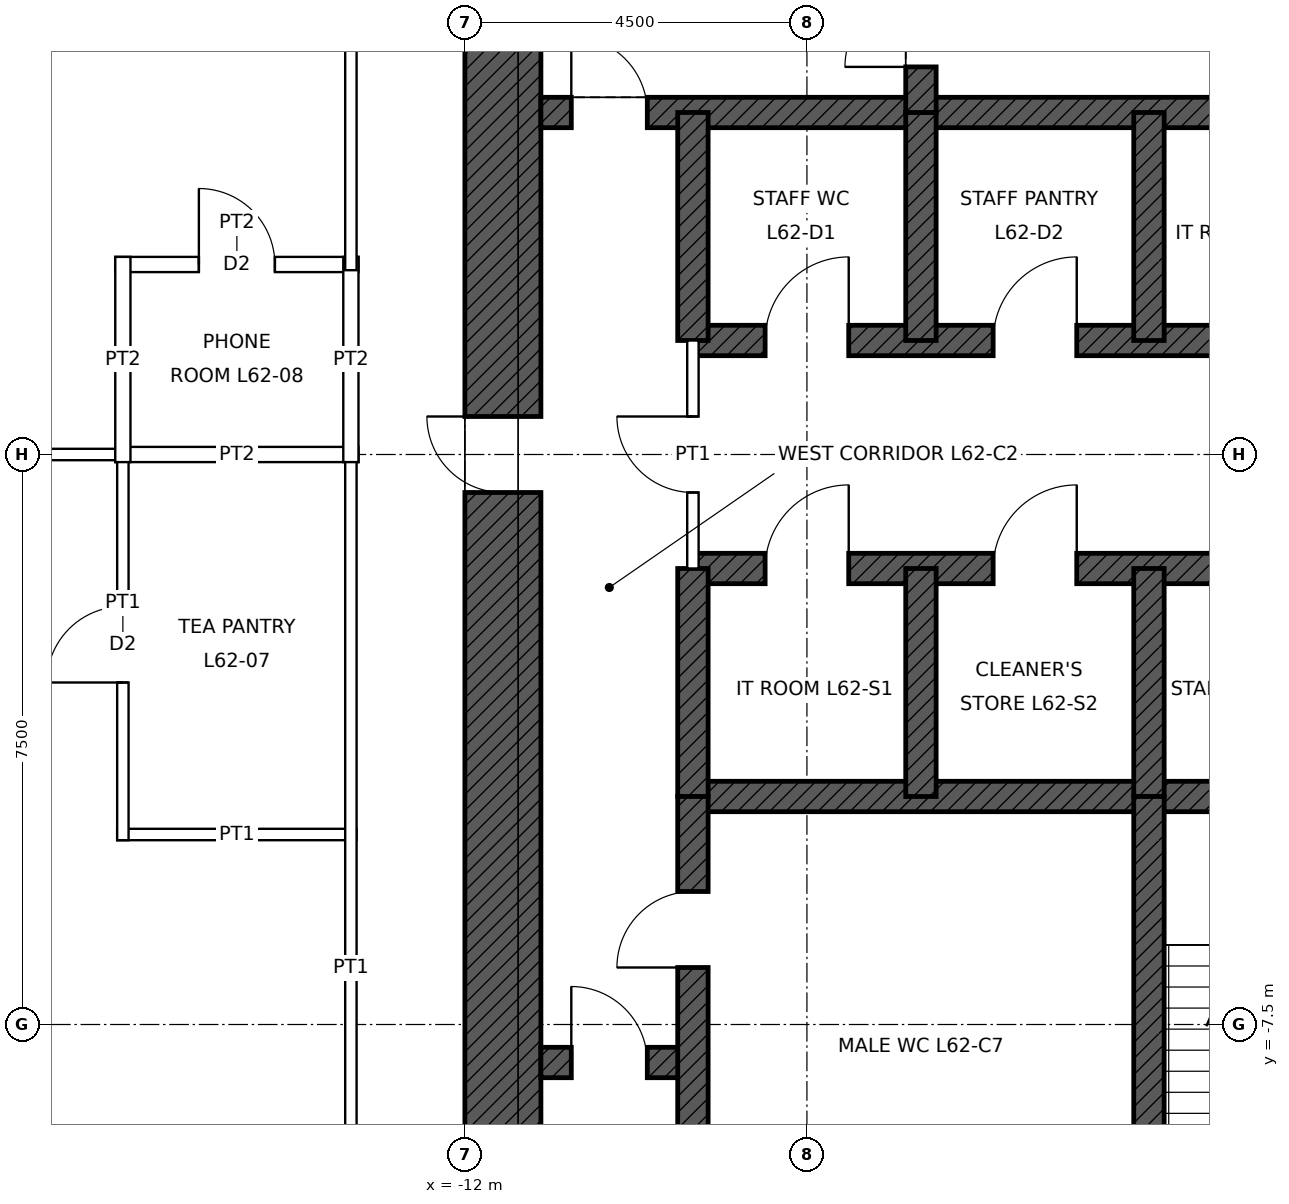
"""IFC4 building model, lengths in metres.
Left out: names, types, materials, properties, quantities, classifications, styles, units other than length and angle.
Written with IfcOpenShell. Run it as: python <this file> out.ifc"""

import sys

from ifc_helpers import new_model, si_unit, direction, frame, frame_2d, origin, place, context, subcontext, project, spatial, rectangle, extrude, element, fill, save


model = new_model("IFC4")
c1 = context("Model", 3, precision=1e-05, world=origin(), true_north=direction((0.0, 1.0)))
c2 = subcontext(c1, "Body", "Model", "MODEL_VIEW")
j1 = project(units=[si_unit("LENGTHUNIT", "METRE"), si_unit("PLANEANGLEUNIT", "RADIAN")], contexts=[c1])
p1 = place(None, origin())
s1 = spatial("IfcSite", under=j1, at=p1, CompositionType="ELEMENT")
p2 = place(p1, origin())
s2 = spatial("IfcBuilding", under=s1, at=p2, CompositionType="ELEMENT")
p3 = place(p2, frame((0.0, 0.0, 283.9)))
s3 = spatial("IfcBuildingStorey", under=s2, at=p3, CompositionType="ELEMENT", Elevation=283.9)
p4 = place(p3, frame((-11.5, -11.0, 0.0), z_axis=(0.0, 0.0, 1.0), x_axis=(0.0, 1.0, 0.0)))
e1 = element("IfcWall", 1, at=p4, inside=s3, PredefinedType="SHEAR", context=c2, shape_type="SweptSolid", body=[
    extrude(rectangle(XDim=22.0, YDim=1.0, at=frame_2d((11.0, 0.0))), origin(), (0.0, 0.0, 1.0), 4.0),
])
p5 = place(p4, frame((10.5, 0.0, 0.0)))
e2 = element("IfcOpeningElement", 2, at=p5, cuts=e1, PredefinedType="OPENING", context=c2, shape_type="SweptSolid", body=[
    extrude(rectangle(XDim=1.0, YDim=2.4, at=frame_2d((0.5, 1.2))), frame((0.0, 0.51, 0.0), z_axis=(0.0, -1.0, 0.0), x_axis=(1.0, 0.0, 0.0)), (0.0, 0.0, 1.0), 1.02),
])
p6 = place(p3, frame((-11.0, 4.5, 0.0), z_axis=(0.0, 0.0, 1.0), x_axis=(1.0, 0.0, 0.0)))
e3 = element("IfcWall", 3, at=p6, inside=s3, PredefinedType="SHEAR", context=c2, shape_type="SweptSolid", body=[
    extrude(rectangle(XDim=22.0, YDim=0.4, at=frame_2d((11.0, 0.0))), origin(), (0.0, 0.0, 1.0), 4.0),
])
p7 = place(p6, frame((0.4, 0.0, 0.0)))
e4 = element("IfcOpeningElement", 4, at=p7, cuts=e3, PredefinedType="OPENING", context=c2, shape_type="SweptSolid", body=[
    extrude(rectangle(XDim=1.0, YDim=2.1, at=frame_2d((0.5, 1.05))), frame((0.0, 0.21, 0.0), z_axis=(0.0, -1.0, 0.0), x_axis=(1.0, 0.0, 0.0)), (0.0, 0.0, 1.0), 0.42),
])
p8 = place(p6, frame((20.6, 0.0, 0.0)))
e5 = element("IfcOpeningElement", 5, at=p8, cuts=e3, PredefinedType="OPENING", context=c2, shape_type="SweptSolid", body=[
    extrude(rectangle(XDim=1.0, YDim=2.1, at=frame_2d((0.5, 1.05))), frame((0.0, 0.21, 0.0), z_axis=(0.0, -1.0, 0.0), x_axis=(1.0, 0.0, 0.0)), (0.0, 0.0, 1.0), 0.42),
])
p9 = place(p3, frame((-9.0, 1.5, 0.0), z_axis=(0.0, 0.0, 1.0), x_axis=(1.0, 0.0, 0.0)))
e6 = element("IfcWall", 6, at=p9, inside=s3, PredefinedType="SHEAR", context=c2, shape_type="SweptSolid", body=[
    extrude(rectangle(XDim=18.0, YDim=0.4, at=frame_2d((9.0, 0.0))), origin(), (0.0, 0.0, 1.0), 4.0),
])
p10 = place(p9, frame((0.95, 0.0, 0.0)))
e7 = element("IfcOpeningElement", 7, at=p10, cuts=e6, PredefinedType="OPENING", context=c2, shape_type="SweptSolid", body=[
    extrude(rectangle(XDim=1.1, YDim=2.1, at=frame_2d((0.55, 1.05))), frame((0.0, 0.21, 0.0), z_axis=(0.0, -1.0, 0.0), x_axis=(1.0, 0.0, 0.0)), (0.0, 0.0, 1.0), 0.42),
])
p11 = place(p9, frame((3.95, 0.0, 0.0)))
e8 = element("IfcOpeningElement", 8, at=p11, cuts=e6, PredefinedType="OPENING", context=c2, shape_type="SweptSolid", body=[
    extrude(rectangle(XDim=1.1, YDim=2.1, at=frame_2d((0.55, 1.05))), frame((0.0, 0.21, 0.0), z_axis=(0.0, -1.0, 0.0), x_axis=(1.0, 0.0, 0.0)), (0.0, 0.0, 1.0), 0.42),
])
p12 = place(p9, frame((6.95, 0.0, 0.0)))
e9 = element("IfcOpeningElement", 9, at=p12, cuts=e6, PredefinedType="OPENING", context=c2, shape_type="SweptSolid", body=[
    extrude(rectangle(XDim=1.1, YDim=2.1, at=frame_2d((0.55, 1.05))), frame((0.0, 0.21, 0.0), z_axis=(0.0, -1.0, 0.0), x_axis=(1.0, 0.0, 0.0)), (0.0, 0.0, 1.0), 0.42),
])
p13 = place(p9, frame((9.95, 0.0, 0.0)))
e10 = element("IfcOpeningElement", 10, at=p13, cuts=e6, PredefinedType="OPENING", context=c2, shape_type="SweptSolid", body=[
    extrude(rectangle(XDim=1.1, YDim=2.1, at=frame_2d((0.55, 1.05))), frame((0.0, 0.21, 0.0), z_axis=(0.0, -1.0, 0.0), x_axis=(1.0, 0.0, 0.0)), (0.0, 0.0, 1.0), 0.42),
])
p14 = place(p9, frame((12.95, 0.0, 0.0)))
e11 = element("IfcOpeningElement", 11, at=p14, cuts=e6, PredefinedType="OPENING", context=c2, shape_type="SweptSolid", body=[
    extrude(rectangle(XDim=1.1, YDim=2.1, at=frame_2d((0.55, 1.05))), frame((0.0, 0.21, 0.0), z_axis=(0.0, -1.0, 0.0), x_axis=(1.0, 0.0, 0.0)), (0.0, 0.0, 1.0), 0.42),
])
p15 = place(p9, frame((15.95, 0.0, 0.0)))
e12 = element("IfcOpeningElement", 12, at=p15, cuts=e6, PredefinedType="OPENING", context=c2, shape_type="SweptSolid", body=[
    extrude(rectangle(XDim=1.1, YDim=2.1, at=frame_2d((0.55, 1.05))), frame((0.0, 0.21, 0.0), z_axis=(0.0, -1.0, 0.0), x_axis=(1.0, 0.0, 0.0)), (0.0, 0.0, 1.0), 0.42),
])
p16 = place(p3, frame((-9.0, -1.5, 0.0), z_axis=(0.0, 0.0, 1.0), x_axis=(1.0, 0.0, 0.0)))
e13 = element("IfcWall", 13, at=p16, inside=s3, PredefinedType="SHEAR", context=c2, shape_type="SweptSolid", body=[
    extrude(rectangle(XDim=18.0, YDim=0.4, at=frame_2d((9.0, 0.0))), origin(), (0.0, 0.0, 1.0), 4.0),
])
p17 = place(p16, frame((9.95, 0.0, 0.0)))
e14 = element("IfcOpeningElement", 14, at=p17, cuts=e13, PredefinedType="OPENING", context=c2, shape_type="SweptSolid", body=[
    extrude(rectangle(XDim=1.1, YDim=2.1, at=frame_2d((0.55, 1.05))), frame((0.0, 0.21, 0.0), z_axis=(0.0, -1.0, 0.0), x_axis=(1.0, 0.0, 0.0)), (0.0, 0.0, 1.0), 0.42),
])
p18 = place(p16, frame((12.95, 0.0, 0.0)))
e15 = element("IfcOpeningElement", 15, at=p18, cuts=e13, PredefinedType="OPENING", context=c2, shape_type="SweptSolid", body=[
    extrude(rectangle(XDim=1.1, YDim=2.1, at=frame_2d((0.55, 1.05))), frame((0.0, 0.21, 0.0), z_axis=(0.0, -1.0, 0.0), x_axis=(1.0, 0.0, 0.0)), (0.0, 0.0, 1.0), 0.42),
])
p19 = place(p16, frame((15.95, 0.0, 0.0)))
e16 = element("IfcOpeningElement", 16, at=p19, cuts=e13, PredefinedType="OPENING", context=c2, shape_type="SweptSolid", body=[
    extrude(rectangle(XDim=1.1, YDim=2.1, at=frame_2d((0.55, 1.05))), frame((0.0, 0.21, 0.0), z_axis=(0.0, -1.0, 0.0), x_axis=(1.0, 0.0, 0.0)), (0.0, 0.0, 1.0), 0.42),
])
p20 = place(p16, frame((0.95, 0.0, 0.0)))
e17 = element("IfcOpeningElement", 17, at=p20, cuts=e13, PredefinedType="OPENING", context=c2, shape_type="SweptSolid", body=[
    extrude(rectangle(XDim=1.1, YDim=2.1, at=frame_2d((0.55, 1.05))), frame((0.0, 0.21, 0.0), z_axis=(0.0, -1.0, 0.0), x_axis=(1.0, 0.0, 0.0)), (0.0, 0.0, 1.0), 0.42),
])
p21 = place(p16, frame((3.95, 0.0, 0.0)))
e18 = element("IfcOpeningElement", 18, at=p21, cuts=e13, PredefinedType="OPENING", context=c2, shape_type="SweptSolid", body=[
    extrude(rectangle(XDim=1.1, YDim=2.1, at=frame_2d((0.55, 1.05))), frame((0.0, 0.21, 0.0), z_axis=(0.0, -1.0, 0.0), x_axis=(1.0, 0.0, 0.0)), (0.0, 0.0, 1.0), 0.42),
])
p22 = place(p16, frame((6.95, 0.0, 0.0)))
e19 = element("IfcOpeningElement", 19, at=p22, cuts=e13, PredefinedType="OPENING", context=c2, shape_type="SweptSolid", body=[
    extrude(rectangle(XDim=1.1, YDim=2.1, at=frame_2d((0.55, 1.05))), frame((0.0, 0.21, 0.0), z_axis=(0.0, -1.0, 0.0), x_axis=(1.0, 0.0, 0.0)), (0.0, 0.0, 1.0), 0.42),
])
p23 = place(p3, frame((-9.0, -4.5, 0.0), z_axis=(0.0, 0.0, 1.0), x_axis=(1.0, 0.0, 0.0)))
e20 = element("IfcWall", 20, at=p23, inside=s3, PredefinedType="SHEAR", context=c2, shape_type="SweptSolid", body=[
    extrude(rectangle(XDim=18.0, YDim=0.4, at=frame_2d((9.0, 0.0))), origin(), (0.0, 0.0, 1.0), 4.0),
])
p24 = place(p3, frame((-11.0, -8.0, 0.0), z_axis=(0.0, 0.0, 1.0), x_axis=(1.0, 0.0, 0.0)))
e21 = element("IfcWall", 21, at=p24, inside=s3, PredefinedType="SHEAR", context=c2, shape_type="SweptSolid", body=[
    extrude(rectangle(XDim=2.0, YDim=0.4, at=frame_2d((1.0, 0.0))), origin(), (0.0, 0.0, 1.0), 4.0),
])
p25 = place(p24, frame((0.4, 0.0, 0.0)))
e22 = element("IfcOpeningElement", 22, at=p25, cuts=e21, PredefinedType="OPENING", context=c2, shape_type="SweptSolid", body=[
    extrude(rectangle(XDim=1.0, YDim=2.1, at=frame_2d((0.5, 1.05))), frame((0.0, 0.21, 0.0), z_axis=(0.0, -1.0, 0.0), x_axis=(1.0, 0.0, 0.0)), (0.0, 0.0, 1.0), 0.42),
])
for number, where, z_axis, x_axis in (
    (23, (-9.0, 1.5, 0.0), (0.0, 0.0, 1.0), (0.0, 1.0, 0.0)),
    (24, (-9.0, -4.5, 0.0), (0.0, 0.0, 1.0), (0.0, 1.0, 0.0)),
    (25, (-6.0, 1.5, 0.0), (0.0, 0.0, 1.0), (0.0, 1.0, 0.0)),
    (26, (-3.0, 1.5, 0.0), (0.0, 0.0, 1.0), (0.0, 1.0, 0.0)),
    (27, (-6.0, -4.5, 0.0), (0.0, 0.0, 1.0), (0.0, 1.0, 0.0)),
    (28, (-3.0, -4.5, 0.0), (0.0, 0.0, 1.0), (0.0, 1.0, 0.0)),
):
    element("IfcWall", number, at=place(p3, frame(where, z_axis=z_axis, x_axis=x_axis)), inside=s3, PredefinedType="SHEAR", context=c2, shape_type="SweptSolid", body=[
        extrude(rectangle(XDim=3.0, YDim=0.4, at=frame_2d((1.5, 0.0))), origin(), (0.0, 0.0, 1.0), 4.0),
    ])
p26 = place(p3, frame((-6.0, 4.5, 0.0), z_axis=(0.0, 0.0, 1.0), x_axis=(0.0, 1.0, 0.0)))
e29 = element("IfcWall", 29, at=p26, inside=s3, PredefinedType="SHEAR", context=c2, shape_type="SweptSolid", body=[
    extrude(rectangle(XDim=6.5, YDim=0.4, at=frame_2d((3.25, 0.0))), origin(), (0.0, 0.0, 1.0), 4.0),
])
p27 = place(p26, frame((0.6, 0.0, 0.0)))
e30 = element("IfcOpeningElement", 30, at=p27, cuts=e29, PredefinedType="OPENING", context=c2, shape_type="SweptSolid", body=[
    extrude(rectangle(XDim=1.0, YDim=2.1, at=frame_2d((0.5, 1.05))), frame((0.0, 0.21, 0.0), z_axis=(0.0, -1.0, 0.0), x_axis=(1.0, 0.0, 0.0)), (0.0, 0.0, 1.0), 0.42),
])
p28 = place(p3, frame((-9.0, -11.0, 0.0), z_axis=(0.0, 0.0, 1.0), x_axis=(0.0, 1.0, 0.0)))
e31 = element("IfcWall", 31, at=p28, inside=s3, PredefinedType="SHEAR", context=c2, shape_type="SweptSolid", body=[
    extrude(rectangle(XDim=6.5, YDim=0.4, at=frame_2d((3.25, 0.0))), origin(), (0.0, 0.0, 1.0), 4.0),
])
p29 = place(p28, frame((4.25, 0.0, 0.0)))
e32 = element("IfcOpeningElement", 32, at=p29, cuts=e31, PredefinedType="OPENING", context=c2, shape_type="SweptSolid", body=[
    extrude(rectangle(XDim=1.0, YDim=2.1, at=frame_2d((0.5, 1.05))), frame((0.0, 0.21, 0.0), z_axis=(0.0, -1.0, 0.0), x_axis=(1.0, 0.0, 0.0)), (0.0, 0.0, 1.0), 0.42),
])
p30 = place(p3, frame((-3.0, -11.0, 0.0), z_axis=(0.0, 0.0, 1.0), x_axis=(0.0, 1.0, 0.0)))
e33 = element("IfcWall", 33, at=p30, inside=s3, PredefinedType="SHEAR", context=c2, shape_type="SweptSolid", body=[
    extrude(rectangle(XDim=6.5, YDim=0.4, at=frame_2d((3.25, 0.0))), origin(), (0.0, 0.0, 1.0), 4.0),
])
p31 = place(p3, frame((-16.575, -5.0, 0.0), z_axis=(0.0, 0.0, 1.0), x_axis=(1.0, 0.0, 0.0)))
e34 = element("IfcWall", 34, at=p31, inside=s3, PredefinedType="PARTITIONING", context=c2, shape_type="SweptSolid", body=[
    extrude(rectangle(XDim=3.15, YDim=0.15, at=frame_2d((1.575, 0.0))), origin(), (0.0, 0.0, 1.0), 3.85),
])
p32 = place(p3, frame((-19.54, 0.0, 0.0), z_axis=(0.0, 0.0, 1.0), x_axis=(1.0, 0.0, 0.0)))
e35 = element("IfcWall", 35, at=p32, inside=s3, PredefinedType="PARTITIONING", context=c2, shape_type="SweptSolid", body=[
    extrude(rectangle(XDim=3.115, YDim=0.15, at=frame_2d((1.558, 0.0))), origin(), (0.0, 0.0, 1.0), 3.243),
])
p33 = place(p3, frame((-16.6, 0.0, 0.0), z_axis=(0.0, 0.0, 1.0), x_axis=(1.0, 0.0, 0.0)))
e36 = element("IfcWall", 36, at=p33, inside=s3, PredefinedType="PARTITIONING", context=c2, shape_type="SweptSolid", body=[
    extrude(rectangle(XDim=3.2, YDim=0.2, at=frame_2d((1.6, 0.0))), origin(), (0.0, 0.0, 1.0), 3.243),
])
p34 = place(p3, frame((-16.6, 2.5, 0.0), z_axis=(0.0, 0.0, 1.0), x_axis=(1.0, 0.0, 0.0)))
e37 = element("IfcWall", 37, at=p34, inside=s3, PredefinedType="PARTITIONING", context=c2, shape_type="SweptSolid", body=[
    extrude(rectangle(XDim=3.2, YDim=0.2, at=frame_2d((1.6, 0.0))), origin(), (0.0, 0.0, 1.0), 3.85),
])
p35 = place(p34, frame((1.1, 0.0, 0.0)))
e38 = element("IfcOpeningElement", 38, at=p35, cuts=e37, PredefinedType="OPENING", context=c2, shape_type="SweptSolid", body=[
    extrude(rectangle(XDim=1.0, YDim=2.1, at=frame_2d((0.5, 1.05))), frame((0.0, 0.11, 0.0), z_axis=(0.0, -1.0, 0.0), x_axis=(1.0, 0.0, 0.0)), (0.0, 0.0, 1.0), 0.22),
])
p36 = place(p3, frame((-16.5, -5.075, 0.0), z_axis=(0.0, 0.0, 1.0), x_axis=(0.0, 1.0, 0.0)))
e39 = element("IfcWall", 39, at=p36, inside=s3, PredefinedType="PARTITIONING", context=c2, shape_type="SweptSolid", body=[
    extrude(rectangle(XDim=5.15, YDim=0.15, at=frame_2d((2.575, 0.0))), origin(), (0.0, 0.0, 1.0), 3.85),
])
p37 = place(p36, frame((2.075, 0.0, 0.0)))
e40 = element("IfcOpeningElement", 40, at=p37, cuts=e39, PredefinedType="OPENING", context=c2, shape_type="SweptSolid", body=[
    extrude(rectangle(XDim=1.0, YDim=2.1, at=frame_2d((0.5, 1.05))), frame((0.0, 0.085, 0.0), z_axis=(0.0, -1.0, 0.0), x_axis=(1.0, 0.0, 0.0)), (0.0, 0.0, 1.0), 0.17),
])
p38 = place(p3, frame((-16.5, -0.1, 0.0), z_axis=(0.0, 0.0, 1.0), x_axis=(0.0, 1.0, 0.0)))
e41 = element("IfcWall", 41, at=p38, inside=s3, PredefinedType="PARTITIONING", context=c2, shape_type="SweptSolid", body=[
    extrude(rectangle(XDim=2.7, YDim=0.2, at=frame_2d((1.35, 0.0))), origin(), (0.0, 0.0, 1.0), 3.85),
])
p39 = place(p3, frame((-13.5, -13.575, 0.0), z_axis=(0.0, 0.0, 1.0), x_axis=(0.0, 1.0, 0.0)))
e42 = element("IfcWall", 42, at=p39, inside=s3, PredefinedType="PARTITIONING", context=c2, shape_type="SweptSolid", body=[
    extrude(rectangle(XDim=13.65, YDim=0.15, at=frame_2d((6.825, 0.0))), origin(), (0.0, 0.0, 1.0), 3.85),
])
p40 = place(p3, frame((-13.5, -0.1, 0.0), z_axis=(0.0, 0.0, 1.0), x_axis=(0.0, 1.0, 0.0)))
e43 = element("IfcWall", 43, at=p40, inside=s3, PredefinedType="PARTITIONING", context=c2, shape_type="SweptSolid", body=[
    extrude(rectangle(XDim=2.7, YDim=0.2, at=frame_2d((1.35, 0.0))), origin(), (0.0, 0.0, 1.0), 3.85),
])
p41 = place(p3, frame((-13.5, 2.425, 0.0), z_axis=(0.0, 0.0, 1.0), x_axis=(0.0, 1.0, 0.0)))
e44 = element("IfcWall", 44, at=p41, inside=s3, PredefinedType="PARTITIONING", context=c2, shape_type="SweptSolid", body=[
    extrude(rectangle(XDim=11.15, YDim=0.15, at=frame_2d((5.575, 0.0))), origin(), (0.0, 0.0, 1.0), 3.85),
])
p42 = place(p41, frame((5.075, 0.0, 0.0)))
e45 = element("IfcOpeningElement", 45, at=p42, cuts=e44, PredefinedType="OPENING", context=c2, shape_type="SweptSolid", body=[
    extrude(rectangle(XDim=1.0, YDim=2.4, at=frame_2d((0.5, 1.2))), frame((0.0, 0.085, 0.0), z_axis=(0.0, -1.0, 0.0), x_axis=(1.0, 0.0, 0.0)), (0.0, 0.0, 1.0), 0.17),
])
p43 = place(p3, frame((-9.0, -1.5, 0.0), z_axis=(0.0, 0.0, 1.0), x_axis=(0.0, 1.0, 0.0)))
e46 = element("IfcWall", 46, at=p43, inside=s3, PredefinedType="PARTITIONING", context=c2, shape_type="SweptSolid", body=[
    extrude(rectangle(XDim=3.0, YDim=0.15, at=frame_2d((1.5, 0.0))), origin(), (0.0, 0.0, 1.0), 3.75),
])
p44 = place(p43, frame((1.0, 0.0, 0.0)))
e47 = element("IfcOpeningElement", 47, at=p44, cuts=e46, PredefinedType="OPENING", context=c2, shape_type="SweptSolid", body=[
    extrude(rectangle(XDim=1.0, YDim=2.4, at=frame_2d((0.5, 1.2))), frame((0.0, 0.085, 0.0), z_axis=(0.0, -1.0, 0.0), x_axis=(1.0, 0.0, 0.0)), (0.0, 0.0, 1.0), 0.17),
])
p45 = place(p7, origin())
e48 = element("IfcDoor", 48, at=p45, inside=s3, OperationType="SINGLE_SWING_LEFT", PredefinedType="DOOR", context=c2, shape_type="SweptSolid", body=[
    extrude(rectangle(XDim=1.0, YDim=2.1, at=frame_2d((0.5, 1.05))), frame((0.0, 0.025, 0.0), z_axis=(0.0, -1.0, 0.0), x_axis=(1.0, 0.0, 0.0)), (0.0, 0.0, 1.0), 0.05),
])
fill(e4, e48)
p46 = place(p27, origin())
e49 = element("IfcDoor", 49, at=p46, inside=s3, OperationType="SINGLE_SWING_LEFT", PredefinedType="DOOR", context=c2, shape_type="SweptSolid", body=[
    extrude(rectangle(XDim=1.0, YDim=2.1, at=frame_2d((0.5, 1.05))), frame((0.0, 0.025, 0.0), z_axis=(0.0, -1.0, 0.0), x_axis=(1.0, 0.0, 0.0)), (0.0, 0.0, 1.0), 0.05),
])
fill(e30, e49)
p47 = place(p5, origin())
e50 = element("IfcDoor", 50, at=p47, inside=s3, OperationType="SINGLE_SWING_RIGHT", PredefinedType="DOOR", context=c2, shape_type="SweptSolid", body=[
    extrude(rectangle(XDim=1.0, YDim=2.4, at=frame_2d((0.5, 1.2))), frame((0.0, 0.485, 0.0), z_axis=(0.0, -1.0, 0.0), x_axis=(1.0, 0.0, 0.0)), (0.0, 0.0, 1.0), 0.05),
])
fill(e2, e50)
p48 = place(p29, origin())
e51 = element("IfcDoor", 51, at=p48, inside=s3, OperationType="SINGLE_SWING_LEFT", PredefinedType="DOOR", context=c2, shape_type="SweptSolid", body=[
    extrude(rectangle(XDim=1.0, YDim=2.1, at=frame_2d((0.5, 1.05))), frame((0.0, 0.025, 0.0), z_axis=(0.0, -1.0, 0.0), x_axis=(1.0, 0.0, 0.0)), (0.0, 0.0, 1.0), 0.05),
])
fill(e32, e51)
p49 = place(p25, origin())
e52 = element("IfcDoor", 52, at=p49, inside=s3, OperationType="SINGLE_SWING_LEFT", PredefinedType="DOOR", context=c2, shape_type="SweptSolid", body=[
    extrude(rectangle(XDim=1.0, YDim=2.1, at=frame_2d((0.5, 1.05))), frame((0.0, 0.025, 0.0), z_axis=(0.0, -1.0, 0.0), x_axis=(1.0, 0.0, 0.0)), (0.0, 0.0, 1.0), 0.05),
])
fill(e22, e52)
p50 = place(p44, origin())
e53 = element("IfcDoor", 53, at=p50, inside=s3, OperationType="SINGLE_SWING_RIGHT", PredefinedType="DOOR", context=c2, shape_type="SweptSolid", body=[
    extrude(rectangle(XDim=1.0, YDim=2.4, at=frame_2d((0.5, 1.2))), frame((0.0, 0.025, 0.0), z_axis=(0.0, -1.0, 0.0), x_axis=(1.0, 0.0, 0.0)), (0.0, 0.0, 1.0), 0.05),
])
fill(e47, e53)
p51 = place(p10, origin())
e54 = element("IfcDoor", 54, at=p51, inside=s3, OperationType="SINGLE_SWING_RIGHT", PredefinedType="DOOR", context=c2, shape_type="SweptSolid", body=[
    extrude(rectangle(XDim=1.1, YDim=2.1, at=frame_2d((0.55, 1.05))), frame((0.0, 0.025, 0.0), z_axis=(0.0, -1.0, 0.0), x_axis=(1.0, 0.0, 0.0)), (0.0, 0.0, 1.0), 0.05),
])
fill(e7, e54)
p52 = place(p11, origin())
e55 = element("IfcDoor", 55, at=p52, inside=s3, OperationType="SINGLE_SWING_RIGHT", PredefinedType="DOOR", context=c2, shape_type="SweptSolid", body=[
    extrude(rectangle(XDim=1.1, YDim=2.1, at=frame_2d((0.55, 1.05))), frame((0.0, 0.025, 0.0), z_axis=(0.0, -1.0, 0.0), x_axis=(1.0, 0.0, 0.0)), (0.0, 0.0, 1.0), 0.05),
])
fill(e8, e55)
p53 = place(p20, origin())
e56 = element("IfcDoor", 56, at=p53, inside=s3, OperationType="SINGLE_SWING_RIGHT", PredefinedType="DOOR", context=c2, shape_type="SweptSolid", body=[
    extrude(rectangle(XDim=1.1, YDim=2.1, at=frame_2d((0.55, 1.05))), frame((0.0, 0.025, 0.0), z_axis=(0.0, -1.0, 0.0), x_axis=(1.0, 0.0, 0.0)), (0.0, 0.0, 1.0), 0.05),
])
fill(e17, e56)
p54 = place(p21, origin())
e57 = element("IfcDoor", 57, at=p54, inside=s3, OperationType="SINGLE_SWING_RIGHT", PredefinedType="DOOR", context=c2, shape_type="SweptSolid", body=[
    extrude(rectangle(XDim=1.1, YDim=2.1, at=frame_2d((0.55, 1.05))), frame((0.0, 0.025, 0.0), z_axis=(0.0, -1.0, 0.0), x_axis=(1.0, 0.0, 0.0)), (0.0, 0.0, 1.0), 0.05),
])
fill(e18, e57)
p55 = place(p37, origin())
e58 = element("IfcDoor", 58, at=p55, inside=s3, OperationType="SINGLE_SWING_LEFT", PredefinedType="DOOR", context=c2, shape_type="SweptSolid", body=[
    extrude(rectangle(XDim=1.0, YDim=2.1, at=frame_2d((0.5, 1.05))), frame((0.0, 0.025, 0.0), z_axis=(0.0, -1.0, 0.0), x_axis=(1.0, 0.0, 0.0)), (0.0, 0.0, 1.0), 0.05),
])
fill(e40, e58)
p56 = place(p35, origin())
e59 = element("IfcDoor", 59, at=p56, inside=s3, OperationType="SINGLE_SWING_LEFT", PredefinedType="DOOR", context=c2, shape_type="SweptSolid", body=[
    extrude(rectangle(XDim=1.0, YDim=2.1, at=frame_2d((0.5, 1.05))), frame((0.0, 0.025, 0.0), z_axis=(0.0, -1.0, 0.0), x_axis=(1.0, 0.0, 0.0)), (0.0, 0.0, 1.0), 0.05),
])
fill(e38, e59)
save(model, sys.argv[1])
